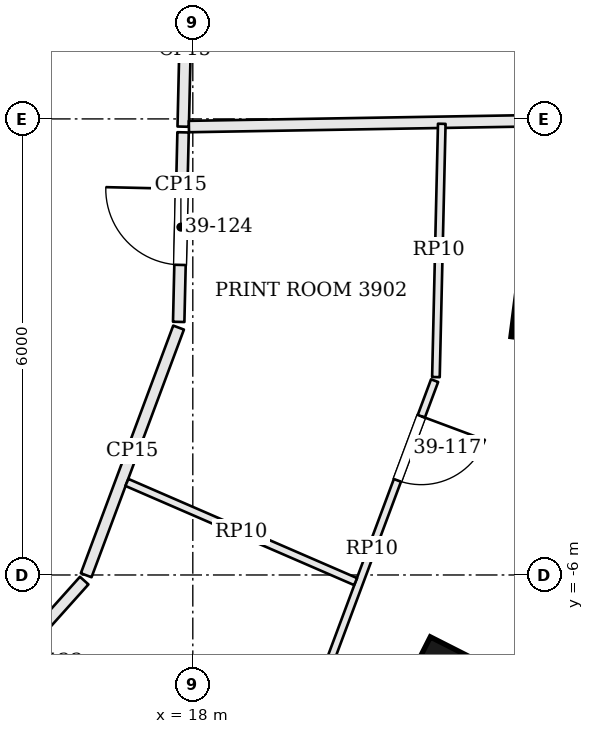
"""IFC4 building model, lengths in metres.
Left out: names, types, materials, properties, quantities, classifications, styles, units other than length and angle.
Written with IfcOpenShell. Run it as: python <this file> out.ifc"""

import sys

from ifc_helpers import new_model, si_unit, direction, frame, frame_2d, origin, origin_2d, place, context, subcontext, project, spatial, rectangle, extrude, element, fill, save


model = new_model("IFC4")
c1 = context("Model", 3, precision=1e-05, world=origin(), true_north=direction((0.0, 1.0)))
c2 = subcontext(c1, "Body", "Model", "MODEL_VIEW")
j1 = project(units=[si_unit("LENGTHUNIT", "METRE"), si_unit("PLANEANGLEUNIT", "RADIAN")], contexts=[c1])
p1 = place(None, origin())
s1 = spatial("IfcSite", under=j1, at=p1, CompositionType="ELEMENT")
p2 = place(p1, origin())
s2 = spatial("IfcBuilding", under=s1, at=p2, CompositionType="ELEMENT")
p3 = place(p2, frame((0.0, 0.0, 161.7)))
s3 = spatial("IfcBuildingStorey", under=s2, at=p3, CompositionType="ELEMENT", Elevation=161.7)
for number, where, z_axis, x_axis in (
    (1, (21.367, -7.554, 0.0), (0.0, 0.0, 1.0), (0.452, 0.892, 0.0)),
    (2, (22.802, -2.389, 0.0), (0.0, 0.0, 1.0), (0.129, 0.992, 0.0)),
):
    element("IfcColumn", number, at=place(p3, frame(where, z_axis=z_axis, x_axis=x_axis)), inside=s3, PredefinedType="COLUMN", context=c2, shape_type="SweptSolid", body=[
        extrude(rectangle(XDim=1.1, YDim=1.1, at=origin_2d()), origin(), (0.0, 0.0, 1.0), 3.9),
    ])
p4 = place(p3, frame((22.361, -7.64, 0.0), z_axis=(0.0, 0.0, 1.0), x_axis=(0.656556431783, 0.754276906636, 0.0)))
e3 = element("IfcWall", 3, at=p4, inside=s3, PredefinedType="SOLIDWALL", context=c2, shape_type="SweptSolid", body=[
    extrude(rectangle(XDim=5.072, YDim=0.45, at=frame_2d((2.536, 0.0))), origin(), (0.0, 0.0, 1.0), 3.7),
])
p5 = place(p4, frame((1.486, 0.0, 0.9)))
e4 = element("IfcOpeningElement", 4, at=p5, cuts=e3, PredefinedType="OPENING", context=c2, shape_type="SweptSolid", body=[
    extrude(rectangle(XDim=2.1, YDim=2.3, at=frame_2d((1.05, 1.15))), frame((0.0, 0.235, 0.0), z_axis=(0.0, -1.0, 0.0), x_axis=(1.0, 0.0, 0.0)), (0.0, 0.0, 1.0), 0.47),
])
p6 = place(p3, frame((17.874, -0.102, 0.0), z_axis=(0.0, 0.0, 1.0), x_axis=(0.023092973745, 0.999733321723, 0.0)))
e5 = element("IfcWall", 5, at=p6, inside=s3, PredefinedType="PARTITIONING", context=c2, shape_type="SweptSolid", body=[
    extrude(rectangle(XDim=2.03, YDim=0.15, at=frame_2d((1.015, 0.0))), origin(), (0.0, 0.0, 1.0), 3.198),
])
p7 = place(p3, frame((27.33, 0.058, 0.0), z_axis=(0.0, 0.0, 1.0), x_axis=(-0.999857832724, -0.016861623308, 0.0)))
e6 = element("IfcWall", 6, at=p7, inside=s3, PredefinedType="PARTITIONING", context=c2, shape_type="SweptSolid", body=[
    extrude(rectangle(XDim=9.382, YDim=0.15, at=frame_2d((4.691, 0.0))), origin(), (0.0, 0.0, 1.0), 3.234),
])
p8 = place(p3, frame((14.709, -8.152, 0.0), z_axis=(0.0, 0.0, 1.0), x_axis=(0.667275630306, 0.744810870758, 0.0)))
e7 = element("IfcWall", 7, at=p8, inside=s3, PredefinedType="PARTITIONING", context=c2, shape_type="SweptSolid", body=[
    extrude(rectangle(XDim=2.79, YDim=0.15, at=frame_2d((1.395, 0.0))), origin(), (0.0, 0.0, 1.0), 3.198),
])
p9 = place(p8, frame((0.85, 0.0, 0.0)))
e8 = element("IfcOpeningElement", 8, at=p9, cuts=e7, PredefinedType="OPENING", context=c2, shape_type="SweptSolid", body=[
    extrude(rectangle(XDim=1.0, YDim=2.1, at=frame_2d((0.5, 1.05))), frame((0.0, 0.085, 0.0), z_axis=(0.0, -1.0, 0.0), x_axis=(1.0, 0.0, 0.0)), (0.0, 0.0, 1.0), 0.17),
])
p10 = place(p3, frame((16.597, -6.003, 0.0), z_axis=(0.0, 0.0, 1.0), x_axis=(0.349499455299, 0.936936567088, 0.0)))
e9 = element("IfcWall", 9, at=p10, inside=s3, PredefinedType="PARTITIONING", context=c2, shape_type="SweptSolid", body=[
    extrude(rectangle(XDim=3.477, YDim=0.15, at=frame_2d((1.739, 0.0))), origin(), (0.0, 0.0, 1.0), 3.198),
])
p11 = place(p3, frame((17.814, -2.67, 0.0), z_axis=(0.0, 0.0, 1.0), x_axis=(0.023001549432, 0.999735429363, 0.0)))
e10 = element("IfcWall", 10, at=p11, inside=s3, PredefinedType="PARTITIONING", context=c2, shape_type="SweptSolid", body=[
    extrude(rectangle(XDim=2.494, YDim=0.15, at=frame_2d((1.247, 0.0))), origin(), (0.0, 0.0, 1.0), 3.198),
])
p12 = place(p11, frame((0.75, 0.0, 0.0)))
e11 = element("IfcOpeningElement", 11, at=p12, cuts=e10, PredefinedType="OPENING", context=c2, shape_type="SweptSolid", body=[
    extrude(rectangle(XDim=1.0, YDim=2.1, at=frame_2d((0.5, 1.05))), frame((0.0, 0.085, 0.0), z_axis=(0.0, -1.0, 0.0), x_axis=(1.0, 0.0, 0.0)), (0.0, 0.0, 1.0), 0.17),
])
p13 = place(p3, frame((21.275, -0.064, 0.0), z_axis=(0.0, 0.0, 1.0), x_axis=(-0.023072470178, -0.999733795127, 0.0)))
e12 = element("IfcWall", 12, at=p13, inside=s3, PredefinedType="PARTITIONING", context=c2, shape_type="SweptSolid", body=[
    extrude(rectangle(XDim=3.333, YDim=0.1, at=frame_2d((1.667, 0.0))), origin(), (0.0, 0.0, 1.0), 3.198),
])
p14 = place(p3, frame((21.181, -3.443, 0.0), z_axis=(0.0, 0.0, 1.0), x_axis=(-0.349438657616, -0.936959243811, 0.0)))
e13 = element("IfcWall", 13, at=p14, inside=s3, PredefinedType="PARTITIONING", context=c2, shape_type="SweptSolid", body=[
    extrude(rectangle(XDim=4.718, YDim=0.1, at=frame_2d((2.359, 0.0))), origin(), (0.0, 0.0, 1.0), 3.198),
])
p15 = place(p14, frame((0.5, 0.0, 0.0)))
e14 = element("IfcOpeningElement", 14, at=p15, cuts=e13, PredefinedType="OPENING", context=c2, shape_type="SweptSolid", body=[
    extrude(rectangle(XDim=0.9, YDim=2.1, at=frame_2d((0.45, 1.05))), frame((0.0, 0.06, 0.0), z_axis=(0.0, -1.0, 0.0), x_axis=(1.0, 0.0, 0.0)), (0.0, 0.0, 1.0), 0.12),
])
p16 = place(p3, frame((17.133, -4.782, 0.0), z_axis=(0.0, 0.0, 1.0), x_axis=(0.917457823469, -0.397833058148, 0.0)))
e15 = element("IfcWall", 15, at=p16, inside=s3, PredefinedType="PARTITIONING", context=c2, shape_type="SweptSolid", body=[
    extrude(rectangle(XDim=3.28, YDim=0.1, at=frame_2d((1.64, 0.0))), origin(), (0.0, 0.0, 1.0), 3.198),
])
p17 = place(p15, origin())
e16 = element("IfcDoor", 16, at=p17, inside=s3, OperationType="SINGLE_SWING_LEFT", PredefinedType="DOOR", context=c2, shape_type="SweptSolid", body=[
    extrude(rectangle(XDim=0.9, YDim=2.1, at=frame_2d((0.45, 1.05))), frame((0.0, 0.025, 0.0), z_axis=(0.0, -1.0, 0.0), x_axis=(1.0, 0.0, 0.0)), (0.0, 0.0, 1.0), 0.05),
])
fill(e14, e16)
p18 = place(p12, origin())
e17 = element("IfcDoor", 17, at=p18, inside=s3, OperationType="SINGLE_SWING_RIGHT", PredefinedType="DOOR", context=c2, shape_type="SweptSolid", body=[
    extrude(rectangle(XDim=1.0, YDim=2.1, at=frame_2d((0.5, 1.05))), frame((0.0, 0.025, 0.0), z_axis=(0.0, -1.0, 0.0), x_axis=(1.0, 0.0, 0.0)), (0.0, 0.0, 1.0), 0.05),
])
fill(e11, e17)
save(model, sys.argv[1])
